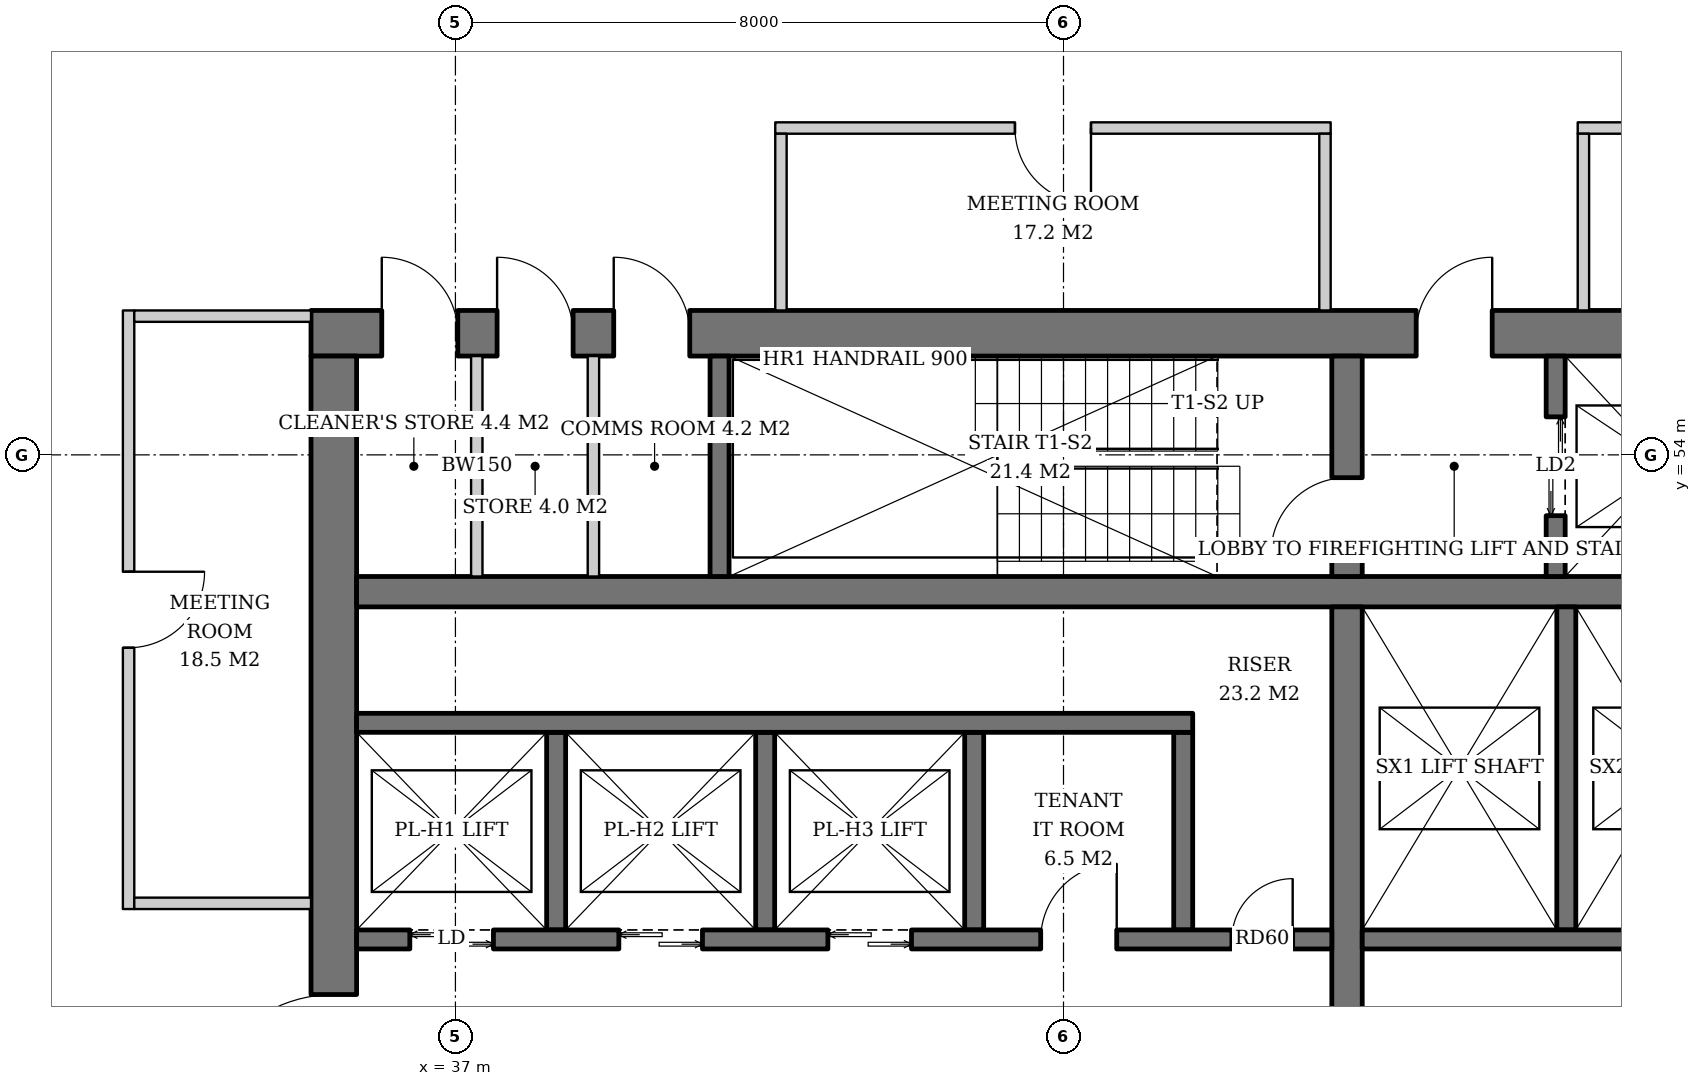
"""IFC4 building model, lengths in metres.
Left out: names, types, materials, properties, quantities, classifications, styles, units other than length and angle.
Written with IfcOpenShell. Run it as: python <this file> out.ifc"""

import sys

from ifc_helpers import new_model, si_unit, direction, frame, frame_2d, origin, place, context, subcontext, project, spatial, rectangle, extrude, element, fill, save


model = new_model("IFC4")
c1 = context("Model", 3, precision=1e-05, world=origin(), true_north=direction((0.0, 1.0)))
c2 = subcontext(c1, "Body", "Model", "MODEL_VIEW")
j1 = project(units=[si_unit("LENGTHUNIT", "METRE"), si_unit("PLANEANGLEUNIT", "RADIAN")], contexts=[c1])
p1 = place(None, origin())
s1 = spatial("IfcSite", under=j1, at=p1, CompositionType="ELEMENT")
p2 = place(p1, origin())
s2 = spatial("IfcBuilding", under=s1, at=p2, CompositionType="ELEMENT")
p3 = place(p2, frame((0.0, 0.0, 173.0)))
s3 = spatial("IfcBuildingStorey", under=s2, at=p3, CompositionType="ELEMENT", Elevation=173.0)
p4 = place(p3, frame((35.1, 55.6, 0.0), z_axis=(0.0, 0.0, 1.0), x_axis=(1.0, 0.0, 0.0)))
e1 = element("IfcWall", 1, at=p4, inside=s3, PredefinedType="SHEAR", context=c2, shape_type="SweptSolid", body=[
    extrude(rectangle(XDim=19.8, YDim=0.6, at=frame_2d((9.9, 0.0))), origin(), (0.0, 0.0, 1.0), 3.8),
])
p5 = place(p4, frame((14.54, 0.0, 0.0)))
e2 = element("IfcOpeningElement", 2, at=p5, cuts=e1, PredefinedType="OPENING", context=c2, shape_type="SweptSolid", body=[
    extrude(rectangle(XDim=1.0, YDim=2.1, at=frame_2d((0.5, 1.05))), frame((0.0, 0.31, 0.0), z_axis=(0.0, -1.0, 0.0), x_axis=(1.0, 0.0, 0.0)), (0.0, 0.0, 1.0), 0.62),
])
p6 = place(p4, frame((0.931, 0.0, 0.0)))
e3 = element("IfcOpeningElement", 3, at=p6, cuts=e1, PredefinedType="OPENING", context=c2, shape_type="SweptSolid", body=[
    extrude(rectangle(XDim=1.0, YDim=2.1, at=frame_2d((0.5, 1.05))), frame((0.0, 0.31, 0.0), z_axis=(0.0, -1.0, 0.0), x_axis=(1.0, 0.0, 0.0)), (0.0, 0.0, 1.0), 0.62),
])
p7 = place(p4, frame((2.448, 0.0, 0.0)))
e4 = element("IfcOpeningElement", 4, at=p7, cuts=e1, PredefinedType="OPENING", context=c2, shape_type="SweptSolid", body=[
    extrude(rectangle(XDim=1.0, YDim=2.1, at=frame_2d((0.5, 1.05))), frame((0.0, 0.31, 0.0), z_axis=(0.0, -1.0, 0.0), x_axis=(1.0, 0.0, 0.0)), (0.0, 0.0, 1.0), 0.62),
])
p8 = place(p4, frame((3.983, 0.0, 0.0)))
e5 = element("IfcOpeningElement", 5, at=p8, cuts=e1, PredefinedType="OPENING", context=c2, shape_type="SweptSolid", body=[
    extrude(rectangle(XDim=1.0, YDim=2.1, at=frame_2d((0.5, 1.05))), frame((0.0, 0.31, 0.0), z_axis=(0.0, -1.0, 0.0), x_axis=(1.0, 0.0, 0.0)), (0.0, 0.0, 1.0), 0.62),
])
p9 = place(p3, frame((35.4, 36.7, 0.0), z_axis=(0.0, 0.0, 1.0), x_axis=(0.0, 1.0, 0.0)))
e6 = element("IfcWall", 6, at=p9, inside=s3, PredefinedType="SHEAR", context=c2, shape_type="SweptSolid", body=[
    extrude(rectangle(XDim=18.6, YDim=0.6, at=frame_2d((9.3, 0.0))), origin(), (0.0, 0.0, 1.0), 3.8),
])
p10 = place(p9, frame((8.4, 0.0, 0.0)))
e7 = element("IfcOpeningElement", 7, at=p10, cuts=e6, PredefinedType="OPENING", context=c2, shape_type="SweptSolid", body=[
    extrude(rectangle(XDim=1.8, YDim=2.4, at=frame_2d((0.9, 1.2))), frame((0.0, 0.31, 0.0), z_axis=(0.0, -1.0, 0.0), x_axis=(1.0, 0.0, 0.0)), (0.0, 0.0, 1.0), 0.62),
])
p11 = place(p3, frame((35.7, 52.2, 0.0), z_axis=(0.0, 0.0, 1.0), x_axis=(1.0, 0.0, 0.0)))
e8 = element("IfcWall", 8, at=p11, inside=s3, PredefinedType="SHEAR", context=c2, shape_type="SweptSolid", body=[
    extrude(rectangle(XDim=18.6, YDim=0.4, at=frame_2d((9.3, 0.0))), origin(), (0.0, 0.0, 1.0), 3.8),
])
p12 = place(p3, frame((48.73, 40.0, 0.0), z_axis=(0.0, 0.0, 1.0), x_axis=(0.0, 1.0, 0.0)))
e9 = element("IfcWall", 9, at=p12, inside=s3, PredefinedType="SHEAR", context=c2, shape_type="SweptSolid", body=[
    extrude(rectangle(XDim=12.0, YDim=0.4, at=frame_2d((6.0, 0.0))), origin(), (0.0, 0.0, 1.0), 3.8),
])
p13 = place(p3, frame((48.73, 52.4, 0.0), z_axis=(0.0, 0.0, 1.0), x_axis=(0.0, 1.0, 0.0)))
e10 = element("IfcWall", 10, at=p13, inside=s3, PredefinedType="SHEAR", context=c2, shape_type="SweptSolid", body=[
    extrude(rectangle(XDim=2.9, YDim=0.4, at=frame_2d((1.45, 0.0))), origin(), (0.0, 0.0, 1.0), 3.8),
])
p14 = place(p13, frame((0.3, 0.0, 0.0)))
e11 = element("IfcOpeningElement", 11, at=p14, cuts=e10, PredefinedType="OPENING", context=c2, shape_type="SweptSolid", body=[
    extrude(rectangle(XDim=1.0, YDim=2.1, at=frame_2d((0.5, 1.05))), frame((0.0, 0.21, 0.0), z_axis=(0.0, -1.0, 0.0), x_axis=(1.0, 0.0, 0.0)), (0.0, 0.0, 1.0), 0.42),
])
p15 = place(p3, frame((40.475, 52.4, 0.0), z_axis=(0.0, 0.0, 1.0), x_axis=(0.0, 1.0, 0.0)))
e12 = element("IfcWall", 12, at=p15, inside=s3, PredefinedType="SHEAR", context=c2, shape_type="SweptSolid", body=[
    extrude(rectangle(XDim=2.9, YDim=0.25, at=frame_2d((1.45, 0.0))), origin(), (0.0, 0.0, 1.0), 3.8),
])
p16 = place(p3, frame((51.475, 52.4, 0.0), z_axis=(0.0, 0.0, 1.0), x_axis=(0.0, 1.0, 0.0)))
e13 = element("IfcWall", 13, at=p16, inside=s3, PredefinedType="SHEAR", context=c2, shape_type="SweptSolid", body=[
    extrude(rectangle(XDim=2.9, YDim=0.25, at=frame_2d((1.45, 0.0))), origin(), (0.0, 0.0, 1.0), 3.8),
])
p17 = place(p16, frame((0.8, 0.0, 0.0)))
e14 = element("IfcOpeningElement", 14, at=p17, cuts=e13, PredefinedType="OPENING", context=c2, shape_type="SweptSolid", body=[
    extrude(rectangle(XDim=1.3, YDim=2.2, at=frame_2d((0.65, 1.1))), frame((0.0, 0.135, 0.0), z_axis=(0.0, -1.0, 0.0), x_axis=(1.0, 0.0, 0.0)), (0.0, 0.0, 1.0), 0.27),
])
for number, where, z_axis, x_axis in (
    (15, (38.325, 47.75, 0.0), (0.0, 0.0, 1.0), (0.0, 1.0, 0.0)),
    (16, (41.075, 47.75, 0.0), (0.0, 0.0, 1.0), (0.0, 1.0, 0.0)),
    (17, (43.825, 47.75, 0.0), (0.0, 0.0, 1.0), (0.0, 1.0, 0.0)),
    (18, (46.575, 47.75, 0.0), (0.0, 0.0, 1.0), (0.0, 1.0, 0.0)),
):
    element("IfcWall", number, at=place(p3, frame(where, z_axis=z_axis, x_axis=x_axis)), inside=s3, PredefinedType="SHEAR", context=c2, shape_type="SweptSolid", body=[
        extrude(rectangle(XDim=2.6, YDim=0.25, at=frame_2d((1.3, 0.0))), origin(), (0.0, 0.0, 1.0), 3.8),
    ])
p18 = place(p3, frame((35.7, 50.475, 0.0), z_axis=(0.0, 0.0, 1.0), x_axis=(1.0, 0.0, 0.0)))
e19 = element("IfcWall", 19, at=p18, inside=s3, PredefinedType="SHEAR", context=c2, shape_type="SweptSolid", body=[
    extrude(rectangle(XDim=11.0, YDim=0.25, at=frame_2d((5.5, 0.0))), origin(), (0.0, 0.0, 1.0), 3.8),
])
p19 = place(p3, frame((35.7, 47.625, 0.0), z_axis=(0.0, 0.0, 1.0), x_axis=(1.0, 0.0, 0.0)))
e20 = element("IfcWall", 20, at=p19, inside=s3, PredefinedType="SHEAR", context=c2, shape_type="SweptSolid", body=[
    extrude(rectangle(XDim=12.83, YDim=0.25, at=frame_2d((6.415, 0.0))), origin(), (0.0, 0.0, 1.0), 3.8),
])
p20 = place(p19, frame((0.7, 0.0, 0.0)))
e21 = element("IfcOpeningElement", 21, at=p20, cuts=e20, PredefinedType="OPENING", context=c2, shape_type="SweptSolid", body=[
    extrude(rectangle(XDim=1.1, YDim=2.2, at=frame_2d((0.55, 1.1))), frame((0.0, 0.135, 0.0), z_axis=(0.0, -1.0, 0.0), x_axis=(1.0, 0.0, 0.0)), (0.0, 0.0, 1.0), 0.27),
])
p21 = place(p19, frame((3.45, 0.0, 0.0)))
e22 = element("IfcOpeningElement", 22, at=p21, cuts=e20, PredefinedType="OPENING", context=c2, shape_type="SweptSolid", body=[
    extrude(rectangle(XDim=1.1, YDim=2.2, at=frame_2d((0.55, 1.1))), frame((0.0, 0.135, 0.0), z_axis=(0.0, -1.0, 0.0), x_axis=(1.0, 0.0, 0.0)), (0.0, 0.0, 1.0), 0.27),
])
p22 = place(p19, frame((6.2, 0.0, 0.0)))
e23 = element("IfcOpeningElement", 23, at=p22, cuts=e20, PredefinedType="OPENING", context=c2, shape_type="SweptSolid", body=[
    extrude(rectangle(XDim=1.1, YDim=2.2, at=frame_2d((0.55, 1.1))), frame((0.0, 0.135, 0.0), z_axis=(0.0, -1.0, 0.0), x_axis=(1.0, 0.0, 0.0)), (0.0, 0.0, 1.0), 0.27),
])
p23 = place(p19, frame((9.0, 0.0, 0.0)))
e24 = element("IfcOpeningElement", 24, at=p23, cuts=e20, PredefinedType="OPENING", context=c2, shape_type="SweptSolid", body=[
    extrude(rectangle(XDim=1.0, YDim=2.1, at=frame_2d((0.5, 1.05))), frame((0.0, 0.135, 0.0), z_axis=(0.0, -1.0, 0.0), x_axis=(1.0, 0.0, 0.0)), (0.0, 0.0, 1.0), 0.27),
])
p24 = place(p19, frame((11.515, 0.0, 0.0)))
e25 = element("IfcOpeningElement", 25, at=p24, cuts=e20, PredefinedType="OPENING", context=c2, shape_type="SweptSolid", body=[
    extrude(rectangle(XDim=0.8, YDim=2.0, at=frame_2d((0.4, 1.0))), frame((0.0, 0.135, 0.0), z_axis=(0.0, -1.0, 0.0), x_axis=(1.0, 0.0, 0.0)), (0.0, 0.0, 1.0), 0.27),
])
p25 = place(p3, frame((51.615, 47.75, 0.0), z_axis=(0.0, 0.0, 1.0), x_axis=(0.0, 1.0, 0.0)))
e26 = element("IfcWall", 26, at=p25, inside=s3, PredefinedType="SHEAR", context=c2, shape_type="SweptSolid", body=[
    extrude(rectangle(XDim=4.25, YDim=0.25, at=frame_2d((2.125, 0.0))), origin(), (0.0, 0.0, 1.0), 3.8),
])
p26 = place(p3, frame((48.93, 47.625, 0.0), z_axis=(0.0, 0.0, 1.0), x_axis=(1.0, 0.0, 0.0)))
e27 = element("IfcWall", 27, at=p26, inside=s3, PredefinedType="SHEAR", context=c2, shape_type="SweptSolid", body=[
    extrude(rectangle(XDim=5.37, YDim=0.25, at=frame_2d((2.685, 0.0))), origin(), (0.0, 0.0, 1.0), 3.8),
])
for number, where, z_axis, x_axis in (
    (28, (37.281, 52.4, 0.0), (0.0, 0.0, 1.0), (0.0, 1.0, 0.0)),
    (29, (38.815, 52.4, 0.0), (0.0, 0.0, 1.0), (0.0, 1.0, 0.0)),
):
    element("IfcWall", number, at=place(p3, frame(where, z_axis=z_axis, x_axis=x_axis)), inside=s3, PredefinedType="SOLIDWALL", context=c2, shape_type="SweptSolid", body=[
        extrude(rectangle(XDim=2.9, YDim=0.15, at=frame_2d((1.45, 0.0))), origin(), (0.0, 0.0, 1.0), 3.62),
    ])
p27 = place(p3, frame((54.9, 58.3, 0.0), z_axis=(0.0, 0.0, 1.0), x_axis=(-1.0, 0.0, 0.0)))
e30 = element("IfcWall", 30, at=p27, inside=s3, PredefinedType="PARTITIONING", context=c2, shape_type="SweptSolid", body=[
    extrude(rectangle(XDim=3.135, YDim=0.15, at=frame_2d((1.567, 0.0))), origin(), (0.0, 0.0, 1.0), 2.92),
])
p28 = place(p27, frame((1.067, 0.0, 0.0)))
e31 = element("IfcOpeningElement", 31, at=p28, cuts=e30, PredefinedType="OPENING", context=c2, shape_type="SweptSolid", body=[
    extrude(rectangle(XDim=1.0, YDim=2.1, at=frame_2d((0.5, 1.05))), frame((0.0, 0.085, 0.0), z_axis=(0.0, -1.0, 0.0), x_axis=(1.0, 0.0, 0.0)), (0.0, 0.0, 1.0), 0.17),
])
p29 = place(p3, frame((51.84, 55.9, 0.0), z_axis=(0.0, 0.0, 1.0), x_axis=(0.0, 1.0, 0.0)))
e32 = element("IfcWall", 32, at=p29, inside=s3, PredefinedType="PARTITIONING", context=c2, shape_type="SweptSolid", body=[
    extrude(rectangle(XDim=2.325, YDim=0.15, at=frame_2d((1.163, 0.0))), origin(), (0.0, 0.0, 1.0), 3.62),
])
p30 = place(p3, frame((48.515, 58.3, 0.0), z_axis=(0.0, 0.0, 1.0), x_axis=(-1.0, 0.0, 0.0)))
e33 = element("IfcWall", 33, at=p30, inside=s3, PredefinedType="PARTITIONING", context=c2, shape_type="SweptSolid", body=[
    extrude(rectangle(XDim=7.307, YDim=0.15, at=frame_2d((3.654, 0.0))), origin(), (0.0, 0.0, 1.0), 2.867),
])
p31 = place(p30, frame((3.154, 0.0, 0.0)))
e34 = element("IfcOpeningElement", 34, at=p31, cuts=e33, PredefinedType="OPENING", context=c2, shape_type="SweptSolid", body=[
    extrude(rectangle(XDim=1.0, YDim=2.1, at=frame_2d((0.5, 1.05))), frame((0.0, 0.085, 0.0), z_axis=(0.0, -1.0, 0.0), x_axis=(1.0, 0.0, 0.0)), (0.0, 0.0, 1.0), 0.17),
])
for number, where, z_axis, x_axis in (
    (35, (48.44, 55.9, 0.0), (0.0, 0.0, 1.0), (0.0, 1.0, 0.0)),
    (36, (41.283, 55.9, 0.0), (0.0, 0.0, 1.0), (0.0, 1.0, 0.0)),
):
    element("IfcWall", number, at=place(p3, frame(where, z_axis=z_axis, x_axis=x_axis)), inside=s3, PredefinedType="PARTITIONING", context=c2, shape_type="SweptSolid", body=[
        extrude(rectangle(XDim=2.325, YDim=0.15, at=frame_2d((1.163, 0.0))), origin(), (0.0, 0.0, 1.0), 3.62),
    ])
p32 = place(p3, frame((32.7, 55.9, 0.0), z_axis=(0.0, 0.0, 1.0), x_axis=(0.0, -1.0, 0.0)))
e37 = element("IfcWall", 37, at=p32, inside=s3, PredefinedType="PARTITIONING", context=c2, shape_type="SweptSolid", body=[
    extrude(rectangle(XDim=7.875, YDim=0.15, at=frame_2d((3.938, 0.0))), origin(), (0.0, 0.0, 1.0), 2.867),
])
p33 = place(p32, frame((3.438, 0.0, 0.0)))
e38 = element("IfcOpeningElement", 38, at=p33, cuts=e37, PredefinedType="OPENING", context=c2, shape_type="SweptSolid", body=[
    extrude(rectangle(XDim=1.0, YDim=2.1, at=frame_2d((0.5, 1.05))), frame((0.0, 0.085, 0.0), z_axis=(0.0, -1.0, 0.0), x_axis=(1.0, 0.0, 0.0)), (0.0, 0.0, 1.0), 0.17),
])
p34 = place(p3, frame((35.1, 55.825, 0.0), z_axis=(0.0, 0.0, 1.0), x_axis=(-1.0, 0.0, 0.0)))
e39 = element("IfcWall", 39, at=p34, inside=s3, PredefinedType="PARTITIONING", context=c2, shape_type="SweptSolid", body=[
    extrude(rectangle(XDim=2.325, YDim=0.15, at=frame_2d((1.163, 0.0))), origin(), (0.0, 0.0, 1.0), 2.867),
])
p35 = place(p3, frame((35.1, 48.1, 0.0), z_axis=(0.0, 0.0, 1.0), x_axis=(-1.0, 0.0, 0.0)))
e40 = element("IfcWall", 40, at=p35, inside=s3, PredefinedType="PARTITIONING", context=c2, shape_type="SweptSolid", body=[
    extrude(rectangle(XDim=2.325, YDim=0.15, at=frame_2d((1.163, 0.0))), origin(), (0.0, 0.0, 1.0), 3.62),
])
p36 = place(p17, origin())
e41 = element("IfcDoor", 41, at=p36, inside=s3, OperationType="DOUBLE_DOOR_SLIDING", PredefinedType="DOOR", context=c2, shape_type="SweptSolid", body=[
    extrude(rectangle(XDim=1.3, YDim=2.2, at=frame_2d((0.65, 1.1))), frame((0.0, 0.025, 0.0), z_axis=(0.0, -1.0, 0.0), x_axis=(1.0, 0.0, 0.0)), (0.0, 0.0, 1.0), 0.05),
])
fill(e14, e41)
p37 = place(p20, origin())
e42 = element("IfcDoor", 42, at=p37, inside=s3, OperationType="DOUBLE_DOOR_SLIDING", PredefinedType="DOOR", context=c2, shape_type="SweptSolid", body=[
    extrude(rectangle(XDim=1.1, YDim=2.2, at=frame_2d((0.55, 1.1))), frame((0.0, 0.025, 0.0), z_axis=(0.0, -1.0, 0.0), x_axis=(1.0, 0.0, 0.0)), (0.0, 0.0, 1.0), 0.05),
])
fill(e21, e42)
p38 = place(p21, origin())
e43 = element("IfcDoor", 43, at=p38, inside=s3, OperationType="DOUBLE_DOOR_SLIDING", PredefinedType="DOOR", context=c2, shape_type="SweptSolid", body=[
    extrude(rectangle(XDim=1.1, YDim=2.2, at=frame_2d((0.55, 1.1))), frame((0.0, 0.025, 0.0), z_axis=(0.0, -1.0, 0.0), x_axis=(1.0, 0.0, 0.0)), (0.0, 0.0, 1.0), 0.05),
])
fill(e22, e43)
p39 = place(p22, origin())
e44 = element("IfcDoor", 44, at=p39, inside=s3, OperationType="DOUBLE_DOOR_SLIDING", PredefinedType="DOOR", context=c2, shape_type="SweptSolid", body=[
    extrude(rectangle(XDim=1.1, YDim=2.2, at=frame_2d((0.55, 1.1))), frame((0.0, 0.025, 0.0), z_axis=(0.0, -1.0, 0.0), x_axis=(1.0, 0.0, 0.0)), (0.0, 0.0, 1.0), 0.05),
])
fill(e23, e44)
p40 = place(p23, origin())
e45 = element("IfcDoor", 45, at=p40, inside=s3, OperationType="SINGLE_SWING_RIGHT", PredefinedType="DOOR", context=c2, shape_type="SweptSolid", body=[
    extrude(rectangle(XDim=1.0, YDim=2.1, at=frame_2d((0.5, 1.05))), frame((0.0, 0.025, 0.0), z_axis=(0.0, -1.0, 0.0), x_axis=(1.0, 0.0, 0.0)), (0.0, 0.0, 1.0), 0.05),
])
fill(e24, e45)
p41 = place(p24, origin())
e46 = element("IfcDoor", 46, at=p41, inside=s3, OperationType="SINGLE_SWING_RIGHT", PredefinedType="DOOR", context=c2, shape_type="SweptSolid", body=[
    extrude(rectangle(XDim=0.8, YDim=2.0, at=frame_2d((0.4, 1.0))), frame((0.0, 0.025, 0.0), z_axis=(0.0, -1.0, 0.0), x_axis=(1.0, 0.0, 0.0)), (0.0, 0.0, 1.0), 0.05),
])
fill(e25, e46)
p42 = place(p14, origin())
e47 = element("IfcDoor", 47, at=p42, inside=s3, OperationType="SINGLE_SWING_LEFT", PredefinedType="DOOR", context=c2, shape_type="SweptSolid", body=[
    extrude(rectangle(XDim=1.0, YDim=2.1, at=frame_2d((0.5, 1.05))), frame((0.0, 0.025, 0.0), z_axis=(0.0, -1.0, 0.0), x_axis=(1.0, 0.0, 0.0)), (0.0, 0.0, 1.0), 0.05),
])
fill(e11, e47)
p43 = place(p5, origin())
e48 = element("IfcDoor", 48, at=p43, inside=s3, OperationType="SINGLE_SWING_RIGHT", PredefinedType="DOOR", context=c2, shape_type="SweptSolid", body=[
    extrude(rectangle(XDim=1.0, YDim=2.1, at=frame_2d((0.5, 1.05))), frame((0.0, 0.025, 0.0), z_axis=(0.0, -1.0, 0.0), x_axis=(1.0, 0.0, 0.0)), (0.0, 0.0, 1.0), 0.05),
])
fill(e2, e48)
p44 = place(p10, origin())
e49 = element("IfcDoor", 49, at=p44, inside=s3, OperationType="DOUBLE_DOOR_SINGLE_SWING", PredefinedType="DOOR", context=c2, shape_type="SweptSolid", body=[
    extrude(rectangle(XDim=1.8, YDim=2.4, at=frame_2d((0.9, 1.2))), frame((0.0, 0.025, 0.0), z_axis=(0.0, -1.0, 0.0), x_axis=(1.0, 0.0, 0.0)), (0.0, 0.0, 1.0), 0.05),
])
fill(e7, e49)
p45 = place(p6, origin())
e50 = element("IfcDoor", 50, at=p45, inside=s3, OperationType="SINGLE_SWING_LEFT", PredefinedType="DOOR", context=c2, shape_type="SweptSolid", body=[
    extrude(rectangle(XDim=1.0, YDim=2.1, at=frame_2d((0.5, 1.05))), frame((0.0, -0.24, 0.0), z_axis=(0.0, -1.0, 0.0), x_axis=(1.0, 0.0, 0.0)), (0.0, 0.0, 1.0), 0.05),
])
fill(e3, e50)
p46 = place(p7, origin())
e51 = element("IfcDoor", 51, at=p46, inside=s3, OperationType="SINGLE_SWING_LEFT", PredefinedType="DOOR", context=c2, shape_type="SweptSolid", body=[
    extrude(rectangle(XDim=1.0, YDim=2.1, at=frame_2d((0.5, 1.05))), frame((0.0, -0.24, 0.0), z_axis=(0.0, -1.0, 0.0), x_axis=(1.0, 0.0, 0.0)), (0.0, 0.0, 1.0), 0.05),
])
fill(e4, e51)
p47 = place(p8, origin())
e52 = element("IfcDoor", 52, at=p47, inside=s3, OperationType="SINGLE_SWING_LEFT", PredefinedType="DOOR", context=c2, shape_type="SweptSolid", body=[
    extrude(rectangle(XDim=1.0, YDim=2.1, at=frame_2d((0.5, 1.05))), frame((0.0, -0.24, 0.0), z_axis=(0.0, -1.0, 0.0), x_axis=(1.0, 0.0, 0.0)), (0.0, 0.0, 1.0), 0.05),
])
fill(e5, e52)
p48 = place(p31, origin())
e53 = element("IfcDoor", 53, at=p48, inside=s3, OperationType="SINGLE_SWING_LEFT", PredefinedType="DOOR", context=c2, shape_type="SweptSolid", body=[
    extrude(rectangle(XDim=1.0, YDim=2.1, at=frame_2d((0.5, 1.05))), frame((0.0, 0.025, 0.0), z_axis=(0.0, -1.0, 0.0), x_axis=(1.0, 0.0, 0.0)), (0.0, 0.0, 1.0), 0.05),
])
fill(e34, e53)
p49 = place(p33, origin())
e54 = element("IfcDoor", 54, at=p49, inside=s3, OperationType="SINGLE_SWING_LEFT", PredefinedType="DOOR", context=c2, shape_type="SweptSolid", body=[
    extrude(rectangle(XDim=1.0, YDim=2.1, at=frame_2d((0.5, 1.05))), frame((0.0, 0.025, 0.0), z_axis=(0.0, -1.0, 0.0), x_axis=(1.0, 0.0, 0.0)), (0.0, 0.0, 1.0), 0.05),
])
fill(e38, e54)
save(model, sys.argv[1])
